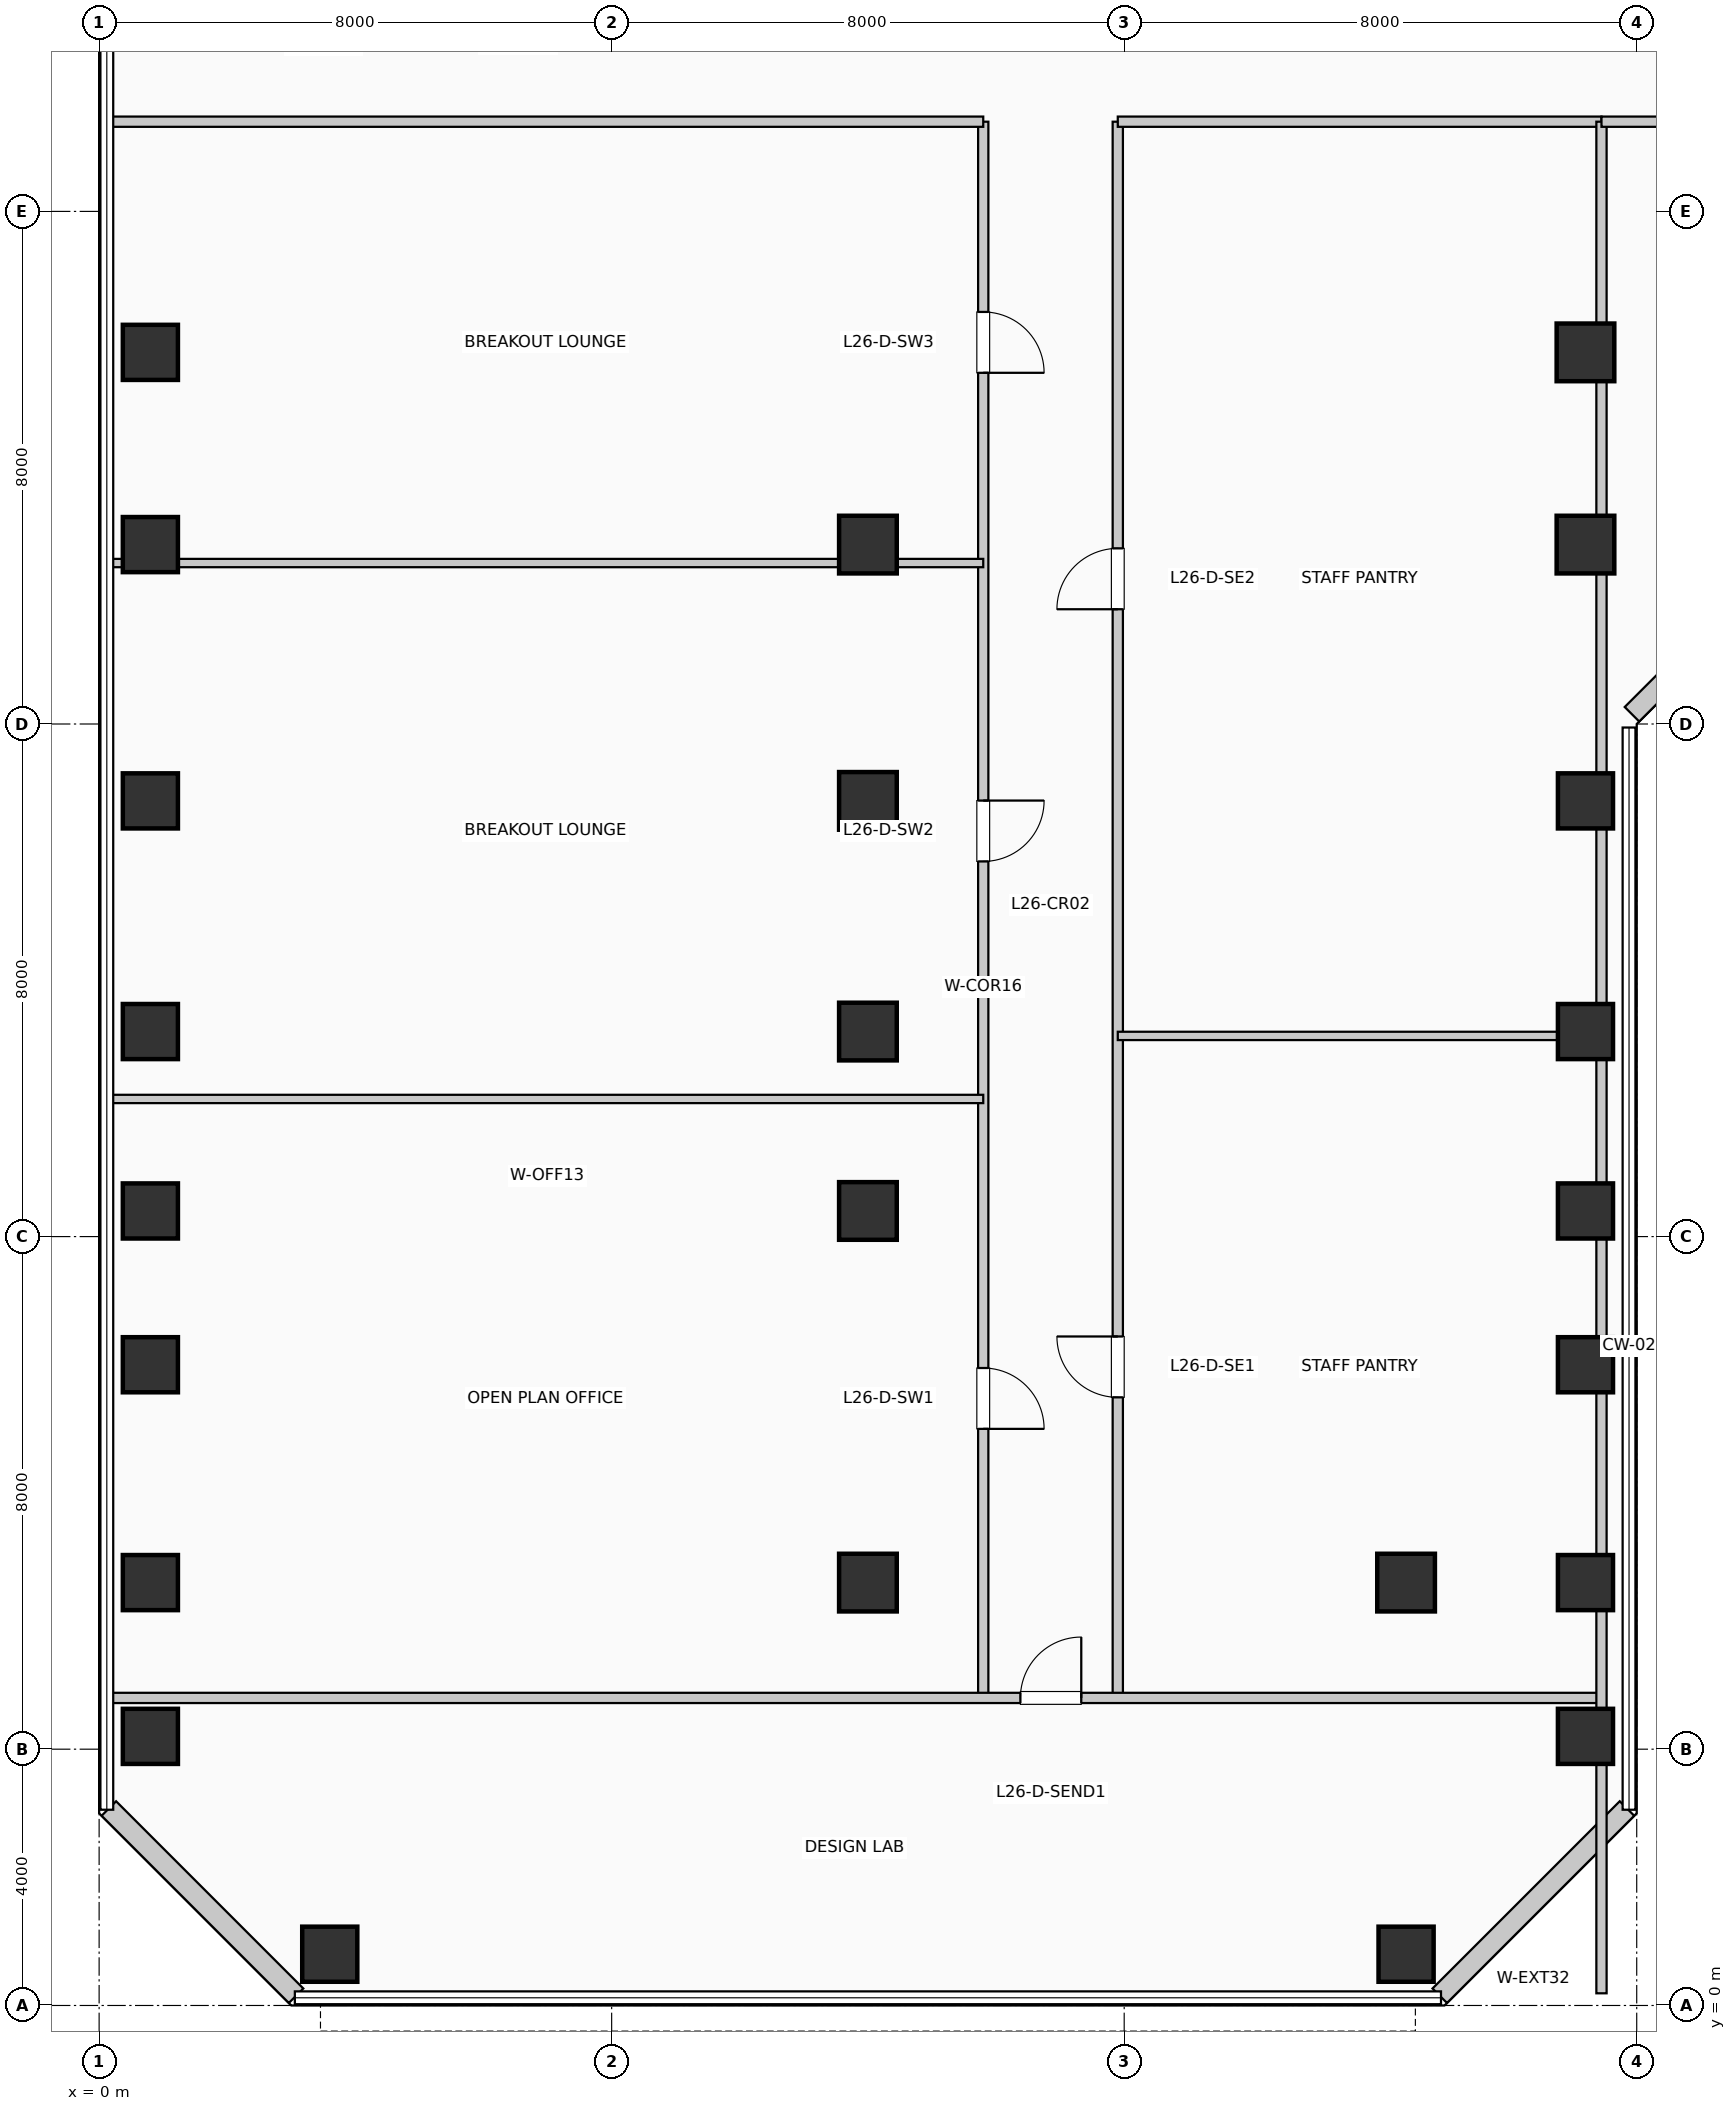
"""IFC4 building model, lengths in metres.
Left out: names, types, materials, properties, quantities, classifications, styles, units other than length and angle.
Written with IfcOpenShell. Run it as: python <this file> out.ifc"""

import sys

from ifc_helpers import new_model, si_unit, direction, frame, frame_2d, origin, origin_2d, place, context, subcontext, project, spatial, rectangle, extrude, element, fill, save


model = new_model("IFC4")
c1 = context("Model", 3, precision=1e-05, world=origin(), true_north=direction((0.0, 1.0)))
c2 = subcontext(c1, "Body", "Model", "MODEL_VIEW")
j1 = project(units=[si_unit("LENGTHUNIT", "METRE"), si_unit("PLANEANGLEUNIT", "RADIAN")], contexts=[c1])
p1 = place(None, origin())
s1 = spatial("IfcSite", under=j1, at=p1, CompositionType="ELEMENT")
p2 = place(p1, origin())
s2 = spatial("IfcBuilding", under=s1, at=p2, CompositionType="ELEMENT")
p3 = place(p2, frame((0.0, 0.0, 110.55)))
s3 = spatial("IfcBuildingStorey", under=s2, at=p3, CompositionType="ELEMENT", Elevation=110.55)
for number, where, z_axis, x_axis in (
    (1, (0.8, 4.2, 0.0), (0.0, 0.0, 1.0), (1.0, 0.0, 0.0)),
    (2, (0.8, 6.6, 0.0), (0.0, 0.0, 1.0), (1.0, 0.0, 0.0)),
    (3, (0.8, 10.0, 0.0), (0.0, 0.0, 1.0), (1.0, 0.0, 0.0)),
    (4, (0.8, 12.4, 0.0), (0.0, 0.0, 1.0), (1.0, 0.0, 0.0)),
    (5, (0.8, 15.2, 0.0), (0.0, 0.0, 1.0), (1.0, 0.0, 0.0)),
    (6, (0.8, 18.8, 0.0), (0.0, 0.0, 1.0), (1.0, 0.0, 0.0)),
    (7, (0.8, 22.8, 0.0), (0.0, 0.0, 1.0), (1.0, 0.0, 0.0)),
    (8, (0.8, 25.8, 0.0), (0.0, 0.0, 1.0), (1.0, 0.0, 0.0)),
    (9, (3.6, 0.8, 0.0), (0.0, 0.0, 1.0), (1.0, 0.0, 0.0)),
):
    element("IfcColumn", number, at=place(p3, frame(where, z_axis=z_axis, x_axis=x_axis)), inside=s3, PredefinedType="COLUMN", context=c2, shape_type="SweptSolid", body=[
        extrude(rectangle(XDim=0.86, YDim=0.86, at=origin_2d()), origin(), (0.0, 0.0, 1.0), 3.96),
    ])
for number, where, z_axis, x_axis in (
    (10, (12.0, 6.6, 0.0), (0.0, 0.0, 1.0), (1.0, 0.0, 0.0)),
    (11, (12.0, 12.4, 0.0), (0.0, 0.0, 1.0), (1.0, 0.0, 0.0)),
    (12, (12.0, 15.2, 0.0), (0.0, 0.0, 1.0), (1.0, 0.0, 0.0)),
    (13, (12.0, 18.8, 0.0), (0.0, 0.0, 1.0), (1.0, 0.0, 0.0)),
    (14, (12.0, 22.8, 0.0), (0.0, 0.0, 1.0), (1.0, 0.0, 0.0)),
):
    element("IfcColumn", number, at=place(p3, frame(where, z_axis=z_axis, x_axis=x_axis)), inside=s3, PredefinedType="COLUMN", context=c2, shape_type="SweptSolid", body=[
        extrude(rectangle(XDim=0.9, YDim=0.9, at=origin_2d()), origin(), (0.0, 0.0, 1.0), 3.96),
    ])
p4 = place(p3, frame((20.4, 0.8, 0.0), z_axis=(0.0, 0.0, 1.0), x_axis=(1.0, 0.0, 0.0)))
e15 = element("IfcColumn", 15, at=p4, inside=s3, PredefinedType="COLUMN", context=c2, shape_type="SweptSolid", body=[
    extrude(rectangle(XDim=0.86, YDim=0.86, at=origin_2d()), origin(), (0.0, 0.0, 1.0), 3.96),
])
p5 = place(p3, frame((20.4, 6.6, 0.0), z_axis=(0.0, 0.0, 1.0), x_axis=(1.0, 0.0, 0.0)))
e16 = element("IfcColumn", 16, at=p5, inside=s3, PredefinedType="COLUMN", context=c2, shape_type="SweptSolid", body=[
    extrude(rectangle(XDim=0.9, YDim=0.9, at=origin_2d()), origin(), (0.0, 0.0, 1.0), 3.96),
])
for number, where, z_axis, x_axis in (
    (17, (23.2, 4.2, 0.0), (0.0, 0.0, 1.0), (1.0, 0.0, 0.0)),
    (18, (23.2, 6.6, 0.0), (0.0, 0.0, 1.0), (1.0, 0.0, 0.0)),
    (19, (23.2, 10.0, 0.0), (0.0, 0.0, 1.0), (1.0, 0.0, 0.0)),
    (20, (23.2, 12.4, 0.0), (0.0, 0.0, 1.0), (1.0, 0.0, 0.0)),
    (21, (23.2, 15.2, 0.0), (0.0, 0.0, 1.0), (1.0, 0.0, 0.0)),
    (22, (23.2, 18.8, 0.0), (0.0, 0.0, 1.0), (1.0, 0.0, 0.0)),
):
    element("IfcColumn", number, at=place(p3, frame(where, z_axis=z_axis, x_axis=x_axis)), inside=s3, PredefinedType="COLUMN", context=c2, shape_type="SweptSolid", body=[
        extrude(rectangle(XDim=0.86, YDim=0.86, at=origin_2d()), origin(), (0.0, 0.0, 1.0), 3.96),
    ])
for number, where, z_axis, x_axis in (
    (23, (23.2, 22.8, 0.0), (0.0, 0.0, 1.0), (1.0, 0.0, 0.0)),
    (24, (23.2, 25.8, 0.0), (0.0, 0.0, 1.0), (1.0, 0.0, 0.0)),
):
    element("IfcColumn", number, at=place(p3, frame(where, z_axis=z_axis, x_axis=x_axis)), inside=s3, PredefinedType="COLUMN", context=c2, shape_type="SweptSolid", body=[
        extrude(rectangle(XDim=0.9, YDim=0.9, at=origin_2d()), origin(), (0.0, 0.0, 1.0), 3.96),
    ])
p6 = place(p3, frame((20.926, 0.152, 0.0), z_axis=(0.0, 0.0, 1.0), x_axis=(0.707106781187, 0.707106781187, 0.0)))
e25 = element("IfcWall", 25, at=p6, inside=s3, PredefinedType="SOLIDWALL", context=c2, shape_type="SweptSolid", body=[
    extrude(rectangle(XDim=4.133, YDim=0.32, at=frame_2d((2.066, 0.0))), origin(), (0.0, 0.0, 1.0), 3.71),
])
p7 = place(p3, frame((23.926, 20.152, 0.0), z_axis=(0.0, 0.0, 1.0), x_axis=(0.707106781187, 0.707106781187, 0.0)))
e26 = element("IfcWall", 26, at=p7, inside=s3, PredefinedType="SOLIDWALL", context=c2, shape_type="SweptSolid", body=[
    extrude(rectangle(XDim=2.718, YDim=0.32, at=frame_2d((1.359, 0.0))), origin(), (0.0, 0.0, 1.0), 3.71),
])
p8 = place(p3, frame((0.152, 3.074, 0.0), z_axis=(0.0, 0.0, 1.0), x_axis=(0.707106781187, -0.707106781187, 0.0)))
e27 = element("IfcWall", 27, at=p8, inside=s3, PredefinedType="SOLIDWALL", context=c2, shape_type="SweptSolid", body=[
    extrude(rectangle(XDim=4.133, YDim=0.32, at=frame_2d((2.066, 0.0))), origin(), (0.0, 0.0, 1.0), 3.71),
])
p9 = place(p3, frame((13.8, 4.8, 0.0), z_axis=(0.0, 0.0, 1.0), x_axis=(0.0, 1.0, 0.0)))
e28 = element("IfcWall", 28, at=p9, inside=s3, PredefinedType="PARTITIONING", context=c2, shape_type="SweptSolid", body=[
    extrude(rectangle(XDim=24.6, YDim=0.16, at=frame_2d((12.3, 0.0))), origin(), (0.0, 0.0, 1.0), 3.71),
])
p10 = place(p9, frame((5.149, 0.0, 0.0), z_axis=(0.0, 0.0, 1.0), x_axis=(-1.0, 0.0, 0.0)))
e29 = element("IfcOpeningElement", 29, at=p10, cuts=e28, PredefinedType="OPENING", context=c2, shape_type="SweptSolid", body=[
    extrude(rectangle(XDim=0.95, YDim=2.15, at=frame_2d((0.475, 1.075))), frame((0.0, 0.09, 0.0), z_axis=(0.0, -1.0, 0.0), x_axis=(1.0, 0.0, 0.0)), (0.0, 0.0, 1.0), 0.18),
])
p11 = place(p9, frame((14.005, 0.0, 0.0), z_axis=(0.0, 0.0, 1.0), x_axis=(-1.0, 0.0, 0.0)))
e30 = element("IfcOpeningElement", 30, at=p11, cuts=e28, PredefinedType="OPENING", context=c2, shape_type="SweptSolid", body=[
    extrude(rectangle(XDim=0.95, YDim=2.15, at=frame_2d((0.475, 1.075))), frame((0.0, 0.09, 0.0), z_axis=(0.0, -1.0, 0.0), x_axis=(1.0, 0.0, 0.0)), (0.0, 0.0, 1.0), 0.18),
])
p12 = place(p9, frame((21.631, 0.0, 0.0), z_axis=(0.0, 0.0, 1.0), x_axis=(-1.0, 0.0, 0.0)))
e31 = element("IfcOpeningElement", 31, at=p12, cuts=e28, PredefinedType="OPENING", context=c2, shape_type="SweptSolid", body=[
    extrude(rectangle(XDim=0.95, YDim=2.15, at=frame_2d((0.475, 1.075))), frame((0.0, 0.09, 0.0), z_axis=(0.0, -1.0, 0.0), x_axis=(1.0, 0.0, 0.0)), (0.0, 0.0, 1.0), 0.18),
])
p13 = place(p3, frame((15.9, 4.8, 0.0), z_axis=(0.0, 0.0, 1.0), x_axis=(0.0, 1.0, 0.0)))
e32 = element("IfcWall", 32, at=p13, inside=s3, PredefinedType="PARTITIONING", context=c2, shape_type="SweptSolid", body=[
    extrude(rectangle(XDim=24.6, YDim=0.16, at=frame_2d((12.3, 0.0))), origin(), (0.0, 0.0, 1.0), 3.71),
])
p14 = place(p13, frame((4.691, 0.0, 0.0)))
e33 = element("IfcOpeningElement", 33, at=p14, cuts=e32, PredefinedType="OPENING", context=c2, shape_type="SweptSolid", body=[
    extrude(rectangle(XDim=0.95, YDim=2.15, at=frame_2d((0.475, 1.075))), frame((0.0, 0.09, 0.0), z_axis=(0.0, -1.0, 0.0), x_axis=(1.0, 0.0, 0.0)), (0.0, 0.0, 1.0), 0.18),
])
p15 = place(p13, frame((16.991, 0.0, 0.0)))
e34 = element("IfcOpeningElement", 34, at=p15, cuts=e32, PredefinedType="OPENING", context=c2, shape_type="SweptSolid", body=[
    extrude(rectangle(XDim=0.95, YDim=2.15, at=frame_2d((0.475, 1.075))), frame((0.0, 0.09, 0.0), z_axis=(0.0, -1.0, 0.0), x_axis=(1.0, 0.0, 0.0)), (0.0, 0.0, 1.0), 0.18),
])
p16 = place(p3, frame((0.19, 4.8, 0.0), z_axis=(0.0, 0.0, 1.0), x_axis=(1.0, 0.0, 0.0)))
e35 = element("IfcWall", 35, at=p16, inside=s3, PredefinedType="PARTITIONING", context=c2, shape_type="SweptSolid", body=[
    extrude(rectangle(XDim=23.26, YDim=0.16, at=frame_2d((11.63, 0.0))), origin(), (0.0, 0.0, 1.0), 3.71),
])
p17 = place(p16, frame((14.19, 0.0, 0.0)))
e36 = element("IfcOpeningElement", 36, at=p17, cuts=e35, PredefinedType="OPENING", context=c2, shape_type="SweptSolid", body=[
    extrude(rectangle(XDim=0.95, YDim=2.15, at=frame_2d((0.475, 1.075))), frame((0.0, 0.09, 0.0), z_axis=(0.0, -1.0, 0.0), x_axis=(1.0, 0.0, 0.0)), (0.0, 0.0, 1.0), 0.18),
])
p18 = place(p3, frame((0.19, 29.4, 0.0), z_axis=(0.0, 0.0, 1.0), x_axis=(1.0, 0.0, 0.0)))
e37 = element("IfcWall", 37, at=p18, inside=s3, PredefinedType="PARTITIONING", context=c2, shape_type="SweptSolid", body=[
    extrude(rectangle(XDim=13.61, YDim=0.16, at=frame_2d((6.805, 0.0))), origin(), (0.0, 0.0, 1.0), 3.365),
])
p19 = place(p3, frame((15.9, 29.4, 0.0), z_axis=(0.0, 0.0, 1.0), x_axis=(1.0, 0.0, 0.0)))
e38 = element("IfcWall", 38, at=p19, inside=s3, PredefinedType="PARTITIONING", context=c2, shape_type="SweptSolid", body=[
    extrude(rectangle(XDim=7.55, YDim=0.16, at=frame_2d((3.775, 0.0))), origin(), (0.0, 0.0, 1.0), 3.71),
])
p20 = place(p3, frame((23.45, 0.19, 0.0), z_axis=(0.0, 0.0, 1.0), x_axis=(0.0, 1.0, 0.0)))
e39 = element("IfcWall", 39, at=p20, inside=s3, PredefinedType="PARTITIONING", context=c2, shape_type="SweptSolid", body=[
    extrude(rectangle(XDim=29.21, YDim=0.16, at=frame_2d((14.605, 0.0))), origin(), (0.0, 0.0, 1.0), 3.045),
])
p21 = place(p3, frame((0.19, 14.148, 0.0), z_axis=(0.0, 0.0, 1.0), x_axis=(1.0, 0.0, 0.0)))
e40 = element("IfcWall", 40, at=p21, inside=s3, PredefinedType="PARTITIONING", context=c2, shape_type="SweptSolid", body=[
    extrude(rectangle(XDim=13.61, YDim=0.13, at=frame_2d((6.805, 0.0))), origin(), (0.0, 0.0, 1.0), 3.71),
])
p22 = place(p3, frame((0.19, 22.512, 0.0), z_axis=(0.0, 0.0, 1.0), x_axis=(1.0, 0.0, 0.0)))
e41 = element("IfcWall", 41, at=p22, inside=s3, PredefinedType="PARTITIONING", context=c2, shape_type="SweptSolid", body=[
    extrude(rectangle(XDim=13.61, YDim=0.13, at=frame_2d((6.805, 0.0))), origin(), (0.0, 0.0, 1.0), 3.045),
])
p23 = place(p3, frame((15.9, 15.132, 0.0), z_axis=(0.0, 0.0, 1.0), x_axis=(1.0, 0.0, 0.0)))
e42 = element("IfcWall", 42, at=p23, inside=s3, PredefinedType="PARTITIONING", context=c2, shape_type="SweptSolid", body=[
    extrude(rectangle(XDim=7.55, YDim=0.13, at=frame_2d((3.775, 0.0))), origin(), (0.0, 0.0, 1.0), 3.045),
])
p24 = place(p3, frame((23.45, 29.4, 0.0), z_axis=(0.0, 0.0, 1.0), x_axis=(1.0, 0.0, 0.0)))
e43 = element("IfcWall", 43, at=p24, inside=s3, PredefinedType="PARTITIONING", context=c2, shape_type="SweptSolid", body=[
    extrude(rectangle(XDim=26.56, YDim=0.16, at=frame_2d((13.28, 0.0))), origin(), (0.0, 0.0, 1.0), 3.365),
])
p25 = place(p24, frame((4.857, 0.0, 0.0), z_axis=(0.0, 0.0, 1.0), x_axis=(-1.0, 0.0, 0.0)))
e44 = element("IfcOpeningElement", 44, at=p25, cuts=e43, PredefinedType="OPENING", context=c2, shape_type="SweptSolid", body=[
    extrude(rectangle(XDim=0.95, YDim=2.15, at=frame_2d((0.475, 1.075))), frame((0.0, 0.09, 0.0), z_axis=(0.0, -1.0, 0.0), x_axis=(1.0, 0.0, 0.0)), (0.0, 0.0, 1.0), 0.18),
])
p26 = place(p24, frame((13.622, 0.0, 0.0), z_axis=(0.0, 0.0, 1.0), x_axis=(-1.0, 0.0, 0.0)))
e45 = element("IfcOpeningElement", 45, at=p26, cuts=e43, PredefinedType="OPENING", context=c2, shape_type="SweptSolid", body=[
    extrude(rectangle(XDim=0.95, YDim=2.15, at=frame_2d((0.475, 1.075))), frame((0.0, 0.09, 0.0), z_axis=(0.0, -1.0, 0.0), x_axis=(1.0, 0.0, 0.0)), (0.0, 0.0, 1.0), 0.18),
])
p27 = place(p24, frame((22.52, 0.0, 0.0), z_axis=(0.0, 0.0, 1.0), x_axis=(-1.0, 0.0, 0.0)))
e46 = element("IfcOpeningElement", 46, at=p27, cuts=e43, PredefinedType="OPENING", context=c2, shape_type="SweptSolid", body=[
    extrude(rectangle(XDim=0.95, YDim=2.15, at=frame_2d((0.475, 1.075))), frame((0.0, 0.09, 0.0), z_axis=(0.0, -1.0, 0.0), x_axis=(1.0, 0.0, 0.0)), (0.0, 0.0, 1.0), 0.18),
])
p28 = place(p17, origin())
e47 = element("IfcDoor", 47, at=p28, inside=s3, OperationType="SINGLE_SWING_RIGHT", PredefinedType="DOOR", context=c2, shape_type="SweptSolid", body=[
    extrude(rectangle(XDim=0.95, YDim=2.15, at=frame_2d((0.475, 1.075))), frame((0.0, 0.025, 0.0), z_axis=(0.0, -1.0, 0.0), x_axis=(1.0, 0.0, 0.0)), (0.0, 0.0, 1.0), 0.05),
])
fill(e36, e47)
p29 = place(p10, origin())
e48 = element("IfcDoor", 48, at=p29, inside=s3, OperationType="SINGLE_SWING_LEFT", PredefinedType="DOOR", context=c2, shape_type="SweptSolid", body=[
    extrude(rectangle(XDim=0.95, YDim=2.15, at=frame_2d((0.475, 1.075))), frame((0.0, 0.025, 0.0), z_axis=(0.0, -1.0, 0.0), x_axis=(1.0, 0.0, 0.0)), (0.0, 0.0, 1.0), 0.05),
])
fill(e29, e48)
p30 = place(p11, origin())
e49 = element("IfcDoor", 49, at=p30, inside=s3, OperationType="SINGLE_SWING_RIGHT", PredefinedType="DOOR", context=c2, shape_type="SweptSolid", body=[
    extrude(rectangle(XDim=0.95, YDim=2.15, at=frame_2d((0.475, 1.075))), frame((0.0, 0.025, 0.0), z_axis=(0.0, -1.0, 0.0), x_axis=(1.0, 0.0, 0.0)), (0.0, 0.0, 1.0), 0.05),
])
fill(e30, e49)
p31 = place(p12, origin())
e50 = element("IfcDoor", 50, at=p31, inside=s3, OperationType="SINGLE_SWING_LEFT", PredefinedType="DOOR", context=c2, shape_type="SweptSolid", body=[
    extrude(rectangle(XDim=0.95, YDim=2.15, at=frame_2d((0.475, 1.075))), frame((0.0, 0.025, 0.0), z_axis=(0.0, -1.0, 0.0), x_axis=(1.0, 0.0, 0.0)), (0.0, 0.0, 1.0), 0.05),
])
fill(e31, e50)
p32 = place(p14, origin())
e51 = element("IfcDoor", 51, at=p32, inside=s3, OperationType="SINGLE_SWING_RIGHT", PredefinedType="DOOR", context=c2, shape_type="SweptSolid", body=[
    extrude(rectangle(XDim=0.95, YDim=2.15, at=frame_2d((0.475, 1.075))), frame((0.0, 0.025, 0.0), z_axis=(0.0, -1.0, 0.0), x_axis=(1.0, 0.0, 0.0)), (0.0, 0.0, 1.0), 0.05),
])
fill(e33, e51)
p33 = place(p15, origin())
e52 = element("IfcDoor", 52, at=p33, inside=s3, OperationType="SINGLE_SWING_LEFT", PredefinedType="DOOR", context=c2, shape_type="SweptSolid", body=[
    extrude(rectangle(XDim=0.95, YDim=2.15, at=frame_2d((0.475, 1.075))), frame((0.0, 0.025, 0.0), z_axis=(0.0, -1.0, 0.0), x_axis=(1.0, 0.0, 0.0)), (0.0, 0.0, 1.0), 0.05),
])
fill(e34, e52)
save(model, sys.argv[1])
